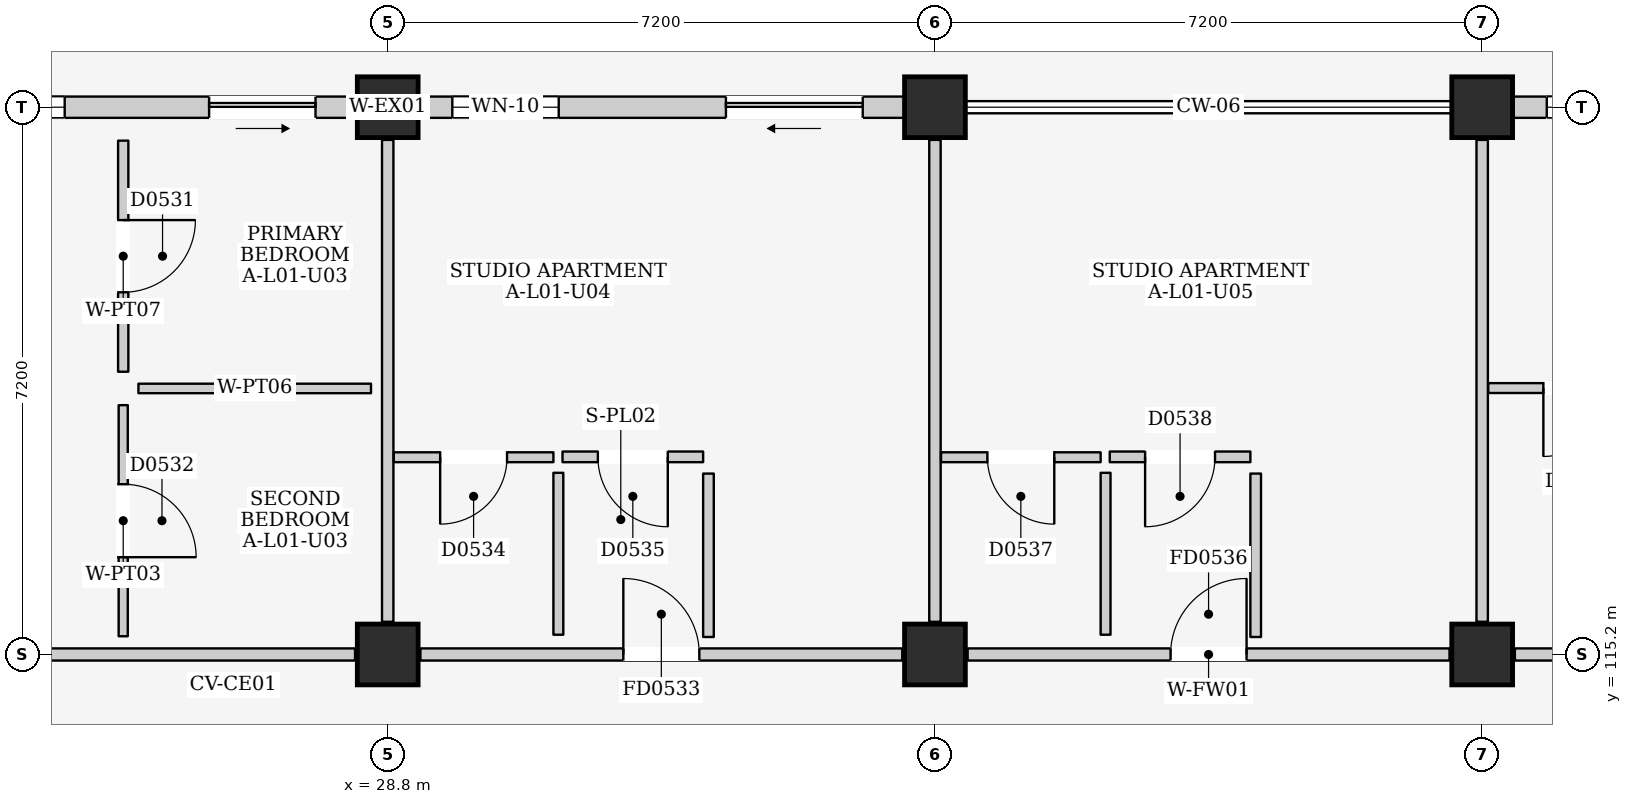
"""IFC4 building model, lengths in metres.
Left out: names, types, materials, properties, quantities, classifications, styles, units other than length and angle.
Written with IfcOpenShell. Run it as: python <this file> out.ifc"""

import sys

from ifc_helpers import new_model, si_unit, direction, frame, frame_2d, origin, origin_2d, place, context, subcontext, project, spatial, rectangle, extrude, element, fill, save


model = new_model("IFC4")
c1 = context("Model", 3, precision=1e-05, world=origin(), true_north=direction((0.0, 1.0)))
c2 = subcontext(c1, "Body", "Model", "MODEL_VIEW")
j1 = project(units=[si_unit("LENGTHUNIT", "METRE"), si_unit("PLANEANGLEUNIT", "RADIAN")], contexts=[c1])
p1 = place(None, origin())
s1 = spatial("IfcSite", under=j1, at=p1, CompositionType="ELEMENT")
p2 = place(p1, origin())
s2 = spatial("IfcBuilding", under=s1, at=p2, CompositionType="ELEMENT")
p3 = place(p2, frame((0.0, 0.0, 4.5)))
s3 = spatial("IfcBuildingStorey", under=s2, at=p3, CompositionType="ELEMENT", Elevation=4.5)
for number, where, z_axis, x_axis in (
    (1, (28.8, 115.2, 0.0), (0.0, 0.0, 1.0), (1.0, 0.0, 0.0)),
    (2, (28.8, 122.4, 0.0), (0.0, 0.0, 1.0), (1.0, 0.0, 0.0)),
    (3, (36.0, 115.2, 0.0), (0.0, 0.0, 1.0), (1.0, 0.0, 0.0)),
    (4, (36.0, 122.4, 0.0), (0.0, 0.0, 1.0), (1.0, 0.0, 0.0)),
    (5, (43.2, 115.2, 0.0), (0.0, 0.0, 1.0), (1.0, 0.0, 0.0)),
    (6, (43.2, 122.4, 0.0), (0.0, 0.0, 1.0), (1.0, 0.0, 0.0)),
):
    element("IfcColumn", number, at=place(p3, frame(where, z_axis=z_axis, x_axis=x_axis)), inside=s3, PredefinedType="COLUMN", context=c2, shape_type="SweptSolid", body=[
        extrude(rectangle(XDim=0.8, YDim=0.8, at=origin_2d()), origin(), (0.0, 0.0, 1.0), 4.5),
    ])
p4 = place(p3, frame((22.0, 122.4, 0.0), z_axis=(0.0, 0.0, 1.0), x_axis=(1.0, 0.0, 0.0)))
e7 = element("IfcWall", 7, at=p4, inside=s3, PredefinedType="ELEMENTEDWALL", context=c2, shape_type="SweptSolid", body=[
    extrude(rectangle(XDim=6.4, YDim=0.28, at=frame_2d((3.2, 0.0))), origin(), (0.0, 0.0, 1.0), 3.715),
])
p5 = place(p4, frame((4.45, 0.0, 0.0)))
e8 = element("IfcOpeningElement", 8, at=p5, cuts=e7, PredefinedType="OPENING", context=c2, shape_type="SweptSolid", body=[
    extrude(rectangle(XDim=1.4, YDim=2.1, at=frame_2d((0.7, 1.05))), frame((0.0, 0.155, 0.0), z_axis=(0.0, -1.0, 0.0), x_axis=(1.0, 0.0, 0.0)), (0.0, 0.0, 1.0), 0.31),
])
p6 = place(p4, frame((0.45, 0.0, 0.9)))
e9 = element("IfcOpeningElement", 9, at=p6, cuts=e7, PredefinedType="OPENING", context=c2, shape_type="SweptSolid", body=[
    extrude(rectangle(XDim=2.1, YDim=1.65, at=frame_2d((1.05, 0.825))), frame((0.0, 0.155, 0.0), z_axis=(0.0, -1.0, 0.0), x_axis=(1.0, 0.0, 0.0)), (0.0, 0.0, 1.0), 0.31),
])
p7 = place(p3, frame((29.2, 122.4, 0.0), z_axis=(0.0, 0.0, 1.0), x_axis=(1.0, 0.0, 0.0)))
e10 = element("IfcWall", 10, at=p7, inside=s3, PredefinedType="ELEMENTEDWALL", context=c2, shape_type="SweptSolid", body=[
    extrude(rectangle(XDim=6.4, YDim=0.28, at=frame_2d((3.2, 0.0))), origin(), (0.0, 0.0, 1.0), 3.715),
])
p8 = place(p7, frame((4.05, 0.0, 0.0)))
e11 = element("IfcOpeningElement", 11, at=p8, cuts=e10, PredefinedType="OPENING", context=c2, shape_type="SweptSolid", body=[
    extrude(rectangle(XDim=1.8, YDim=2.12, at=frame_2d((0.9, 1.06))), frame((0.0, 0.155, 0.0), z_axis=(0.0, -1.0, 0.0), x_axis=(1.0, 0.0, 0.0)), (0.0, 0.0, 1.0), 0.31),
])
p9 = place(p7, frame((0.45, 0.0, 0.9)))
e12 = element("IfcOpeningElement", 12, at=p9, cuts=e10, PredefinedType="OPENING", context=c2, shape_type="SweptSolid", body=[
    extrude(rectangle(XDim=1.4, YDim=1.2, at=frame_2d((0.7, 0.6))), frame((0.0, 0.155, 0.0), z_axis=(0.0, -1.0, 0.0), x_axis=(1.0, 0.0, 0.0)), (0.0, 0.0, 1.0), 0.31),
])
p10 = place(p3, frame((43.6, 122.4, 0.0), z_axis=(0.0, 0.0, 1.0), x_axis=(1.0, 0.0, 0.0)))
e13 = element("IfcWall", 13, at=p10, inside=s3, PredefinedType="ELEMENTEDWALL", context=c2, shape_type="SweptSolid", body=[
    extrude(rectangle(XDim=6.4, YDim=0.28, at=frame_2d((3.2, 0.0))), origin(), (0.0, 0.0, 1.0), 3.715),
])
p11 = place(p10, frame((4.35, 0.0, 0.0)))
e14 = element("IfcOpeningElement", 14, at=p11, cuts=e13, PredefinedType="OPENING", context=c2, shape_type="SweptSolid", body=[
    extrude(rectangle(XDim=1.5, YDim=2.12, at=frame_2d((0.75, 1.06))), frame((0.0, 0.155, 0.0), z_axis=(0.0, -1.0, 0.0), x_axis=(1.0, 0.0, 0.0)), (0.0, 0.0, 1.0), 0.31),
])
p12 = place(p10, frame((0.45, 0.0, 0.9)))
e15 = element("IfcOpeningElement", 15, at=p12, cuts=e13, PredefinedType="OPENING", context=c2, shape_type="SweptSolid", body=[
    extrude(rectangle(XDim=1.7, YDim=1.45, at=frame_2d((0.85, 0.725))), frame((0.0, 0.155, 0.0), z_axis=(0.0, -1.0, 0.0), x_axis=(1.0, 0.0, 0.0)), (0.0, 0.0, 1.0), 0.31),
])
p13 = place(p3, frame((22.03, 115.2, 0.0), z_axis=(0.0, 0.0, 1.0), x_axis=(1.0, 0.0, 0.0)))
e16 = element("IfcWall", 16, at=p13, inside=s3, PredefinedType="PARTITIONING", context=c2, shape_type="SweptSolid", body=[
    extrude(rectangle(XDim=6.34, YDim=0.16, at=frame_2d((3.17, 0.0))), origin(), (0.0, 0.0, 1.0), 3.585),
])
p14 = place(p3, frame((28.8, 115.63, 0.0), z_axis=(0.0, 0.0, 1.0), x_axis=(0.0, 1.0, 0.0)))
e17 = element("IfcWall", 17, at=p14, inside=s3, PredefinedType="PARTITIONING", context=c2, shape_type="SweptSolid", body=[
    extrude(rectangle(XDim=6.34, YDim=0.15, at=frame_2d((3.17, 0.0))), origin(), (0.0, 0.0, 1.0), 3.685),
])
p15 = place(p3, frame((25.32, 118.92, 0.0), z_axis=(0.0, 0.0, 1.0), x_axis=(0.0, 1.0, 0.0)))
e18 = element("IfcWall", 18, at=p15, inside=s3, PredefinedType="PARTITIONING", context=c2, shape_type="SweptSolid", body=[
    extrude(rectangle(XDim=3.04, YDim=0.135, at=frame_2d((1.52, 0.0))), origin(), (0.0, 0.0, 1.0), 4.25),
])
p16 = place(p15, frame((1.045, 0.0, 0.0)))
e19 = element("IfcOpeningElement", 19, at=p16, cuts=e18, PredefinedType="OPENING", context=c2, shape_type="SweptSolid", body=[
    extrude(rectangle(XDim=0.95, YDim=2.15, at=frame_2d((0.475, 1.075))), frame((0.0, 0.083, 0.0), z_axis=(0.0, -1.0, 0.0), x_axis=(1.0, 0.0, 0.0)), (0.0, 0.0, 1.0), 0.165),
])
p17 = place(p3, frame((25.52, 118.7, 0.0), z_axis=(0.0, 0.0, 1.0), x_axis=(1.0, 0.0, 0.0)))
e20 = element("IfcWall", 20, at=p17, inside=s3, PredefinedType="PARTITIONING", context=c2, shape_type="SweptSolid", body=[
    extrude(rectangle(XDim=3.06, YDim=0.125, at=frame_2d((1.53, 0.0))), origin(), (0.0, 0.0, 1.0), 4.25),
])
p18 = place(p3, frame((25.32, 115.44, 0.0), z_axis=(0.0, 0.0, 1.0), x_axis=(0.0, 1.0, 0.0)))
e21 = element("IfcWall", 21, at=p18, inside=s3, PredefinedType="PARTITIONING", context=c2, shape_type="SweptSolid", body=[
    extrude(rectangle(XDim=3.04, YDim=0.12, at=frame_2d((1.52, 0.0))), origin(), (0.0, 0.0, 1.0), 4.25),
])
p19 = place(p18, frame((1.04, 0.0, 0.0)))
e22 = element("IfcOpeningElement", 22, at=p19, cuts=e21, PredefinedType="OPENING", context=c2, shape_type="SweptSolid", body=[
    extrude(rectangle(XDim=0.96, YDim=2.15, at=frame_2d((0.48, 1.075))), frame((0.0, 0.075, 0.0), z_axis=(0.0, -1.0, 0.0), x_axis=(1.0, 0.0, 0.0)), (0.0, 0.0, 1.0), 0.15),
])
p20 = place(p3, frame((29.23, 115.2, 0.0), z_axis=(0.0, 0.0, 1.0), x_axis=(1.0, 0.0, 0.0)))
e23 = element("IfcWall", 23, at=p20, inside=s3, PredefinedType="PARTITIONING", context=c2, shape_type="SweptSolid", body=[
    extrude(rectangle(XDim=6.34, YDim=0.16, at=frame_2d((3.17, 0.0))), origin(), (0.0, 0.0, 1.0), 3.585),
])
p21 = place(p20, frame((2.67, 0.0, 0.0)))
e24 = element("IfcOpeningElement", 24, at=p21, cuts=e23, PredefinedType="OPENING", context=c2, shape_type="SweptSolid", body=[
    extrude(rectangle(XDim=1.0, YDim=2.15, at=frame_2d((0.5, 1.075))), frame((0.0, 0.095, 0.0), z_axis=(0.0, -1.0, 0.0), x_axis=(1.0, 0.0, 0.0)), (0.0, 0.0, 1.0), 0.19),
])
p22 = place(p3, frame((36.0, 115.63, 0.0), z_axis=(0.0, 0.0, 1.0), x_axis=(0.0, 1.0, 0.0)))
e25 = element("IfcWall", 25, at=p22, inside=s3, PredefinedType="PARTITIONING", context=c2, shape_type="SweptSolid", body=[
    extrude(rectangle(XDim=6.34, YDim=0.15, at=frame_2d((3.17, 0.0))), origin(), (0.0, 0.0, 1.0), 3.685),
])
p23 = place(p3, frame((28.88, 117.795, 0.0), z_axis=(0.0, 0.0, 1.0), x_axis=(1.0, 0.0, 0.0)))
e26 = element("IfcWall", 26, at=p23, inside=s3, PredefinedType="PARTITIONING", context=c2, shape_type="SweptSolid", body=[
    extrude(rectangle(XDim=2.1, YDim=0.13, at=frame_2d((1.05, 0.0))), origin(), (0.0, 0.0, 1.0), 4.25),
])
p24 = place(p23, frame((0.61, 0.0, 0.0)))
e27 = element("IfcOpeningElement", 27, at=p24, cuts=e26, PredefinedType="OPENING", context=c2, shape_type="SweptSolid", body=[
    extrude(rectangle(XDim=0.88, YDim=2.1, at=frame_2d((0.44, 1.05))), frame((0.0, 0.08, 0.0), z_axis=(0.0, -1.0, 0.0), x_axis=(1.0, 0.0, 0.0)), (0.0, 0.0, 1.0), 0.16),
])
p25 = place(p3, frame((31.045, 115.46, 0.0), z_axis=(0.0, 0.0, 1.0), x_axis=(0.0, 1.0, 0.0)))
e28 = element("IfcWall", 28, at=p25, inside=s3, PredefinedType="PARTITIONING", context=c2, shape_type="SweptSolid", body=[
    extrude(rectangle(XDim=2.13, YDim=0.13, at=frame_2d((1.065, 0.0))), origin(), (0.0, 0.0, 1.0), 4.25),
])
p26 = place(p3, frame((31.1, 117.8, 0.0), z_axis=(0.0, 0.0, 1.0), x_axis=(1.0, 0.0, 0.0)))
e29 = element("IfcWall", 29, at=p26, inside=s3, PredefinedType="PARTITIONING", context=c2, shape_type="SweptSolid", body=[
    extrude(rectangle(XDim=1.85, YDim=0.14, at=frame_2d((0.925, 0.0))), origin(), (0.0, 0.0, 1.0), 4.25),
])
p27 = place(p26, frame((0.465, 0.0, 0.0)))
e30 = element("IfcOpeningElement", 30, at=p27, cuts=e29, PredefinedType="OPENING", context=c2, shape_type="SweptSolid", body=[
    extrude(rectangle(XDim=0.92, YDim=2.1, at=frame_2d((0.46, 1.05))), frame((0.0, 0.085, 0.0), z_axis=(0.0, -1.0, 0.0), x_axis=(1.0, 0.0, 0.0)), (0.0, 0.0, 1.0), 0.17),
])
p28 = place(p3, frame((33.02, 115.43, 0.0), z_axis=(0.0, 0.0, 1.0), x_axis=(0.0, 1.0, 0.0)))
e31 = element("IfcWall", 31, at=p28, inside=s3, PredefinedType="PARTITIONING", context=c2, shape_type="SweptSolid", body=[
    extrude(rectangle(XDim=2.15, YDim=0.14, at=frame_2d((1.075, 0.0))), origin(), (0.0, 0.0, 1.0), 4.25),
])
p29 = place(p3, frame((36.43, 115.2, 0.0), z_axis=(0.0, 0.0, 1.0), x_axis=(1.0, 0.0, 0.0)))
e32 = element("IfcWall", 32, at=p29, inside=s3, PredefinedType="PARTITIONING", context=c2, shape_type="SweptSolid", body=[
    extrude(rectangle(XDim=6.34, YDim=0.16, at=frame_2d((3.17, 0.0))), origin(), (0.0, 0.0, 1.0), 3.585),
])
p30 = place(p29, frame((2.67, 0.0, 0.0)))
e33 = element("IfcOpeningElement", 33, at=p30, cuts=e32, PredefinedType="OPENING", context=c2, shape_type="SweptSolid", body=[
    extrude(rectangle(XDim=1.0, YDim=2.15, at=frame_2d((0.5, 1.075))), frame((0.0, 0.095, 0.0), z_axis=(0.0, -1.0, 0.0), x_axis=(1.0, 0.0, 0.0)), (0.0, 0.0, 1.0), 0.19),
])
p31 = place(p3, frame((43.2, 115.63, 0.0), z_axis=(0.0, 0.0, 1.0), x_axis=(0.0, 1.0, 0.0)))
e34 = element("IfcWall", 34, at=p31, inside=s3, PredefinedType="PARTITIONING", context=c2, shape_type="SweptSolid", body=[
    extrude(rectangle(XDim=6.34, YDim=0.15, at=frame_2d((3.17, 0.0))), origin(), (0.0, 0.0, 1.0), 3.685),
])
p32 = place(p3, frame((36.08, 117.795, 0.0), z_axis=(0.0, 0.0, 1.0), x_axis=(1.0, 0.0, 0.0)))
e35 = element("IfcWall", 35, at=p32, inside=s3, PredefinedType="PARTITIONING", context=c2, shape_type="SweptSolid", body=[
    extrude(rectangle(XDim=2.1, YDim=0.13, at=frame_2d((1.05, 0.0))), origin(), (0.0, 0.0, 1.0), 4.25),
])
p33 = place(p32, frame((0.61, 0.0, 0.0)))
e36 = element("IfcOpeningElement", 36, at=p33, cuts=e35, PredefinedType="OPENING", context=c2, shape_type="SweptSolid", body=[
    extrude(rectangle(XDim=0.88, YDim=2.1, at=frame_2d((0.44, 1.05))), frame((0.0, 0.08, 0.0), z_axis=(0.0, -1.0, 0.0), x_axis=(1.0, 0.0, 0.0)), (0.0, 0.0, 1.0), 0.16),
])
p34 = place(p3, frame((38.245, 115.46, 0.0), z_axis=(0.0, 0.0, 1.0), x_axis=(0.0, 1.0, 0.0)))
e37 = element("IfcWall", 37, at=p34, inside=s3, PredefinedType="PARTITIONING", context=c2, shape_type="SweptSolid", body=[
    extrude(rectangle(XDim=2.13, YDim=0.13, at=frame_2d((1.065, 0.0))), origin(), (0.0, 0.0, 1.0), 4.25),
])
p35 = place(p3, frame((38.3, 117.8, 0.0), z_axis=(0.0, 0.0, 1.0), x_axis=(1.0, 0.0, 0.0)))
e38 = element("IfcWall", 38, at=p35, inside=s3, PredefinedType="PARTITIONING", context=c2, shape_type="SweptSolid", body=[
    extrude(rectangle(XDim=1.85, YDim=0.14, at=frame_2d((0.925, 0.0))), origin(), (0.0, 0.0, 1.0), 4.25),
])
p36 = place(p35, frame((0.465, 0.0, 0.0)))
e39 = element("IfcOpeningElement", 39, at=p36, cuts=e38, PredefinedType="OPENING", context=c2, shape_type="SweptSolid", body=[
    extrude(rectangle(XDim=0.92, YDim=2.1, at=frame_2d((0.46, 1.05))), frame((0.0, 0.085, 0.0), z_axis=(0.0, -1.0, 0.0), x_axis=(1.0, 0.0, 0.0)), (0.0, 0.0, 1.0), 0.17),
])
p37 = place(p3, frame((40.22, 115.43, 0.0), z_axis=(0.0, 0.0, 1.0), x_axis=(0.0, 1.0, 0.0)))
e40 = element("IfcWall", 40, at=p37, inside=s3, PredefinedType="PARTITIONING", context=c2, shape_type="SweptSolid", body=[
    extrude(rectangle(XDim=2.15, YDim=0.14, at=frame_2d((1.075, 0.0))), origin(), (0.0, 0.0, 1.0), 4.25),
])
p38 = place(p3, frame((43.63, 115.2, 0.0), z_axis=(0.0, 0.0, 1.0), x_axis=(1.0, 0.0, 0.0)))
e41 = element("IfcWall", 41, at=p38, inside=s3, PredefinedType="PARTITIONING", context=c2, shape_type="SweptSolid", body=[
    extrude(rectangle(XDim=6.34, YDim=0.16, at=frame_2d((3.17, 0.0))), origin(), (0.0, 0.0, 1.0), 3.585),
])
p39 = place(p38, frame((5.16, 0.0, 0.0)))
e42 = element("IfcOpeningElement", 42, at=p39, cuts=e41, PredefinedType="OPENING", context=c2, shape_type="SweptSolid", body=[
    extrude(rectangle(XDim=1.0, YDim=2.15, at=frame_2d((0.5, 1.075))), frame((0.0, 0.095, 0.0), z_axis=(0.0, -1.0, 0.0), x_axis=(1.0, 0.0, 0.0)), (0.0, 0.0, 1.0), 0.19),
])
p40 = place(p3, frame((43.28, 118.705, 0.0), z_axis=(0.0, 0.0, 1.0), x_axis=(1.0, 0.0, 0.0)))
e43 = element("IfcWall", 43, at=p40, inside=s3, PredefinedType="PARTITIONING", context=c2, shape_type="SweptSolid", body=[
    extrude(rectangle(XDim=2.35, YDim=0.13, at=frame_2d((1.175, 0.0))), origin(), (0.0, 0.0, 1.0), 4.25),
])
p41 = place(p40, frame((0.725, 0.0, 0.0)))
e44 = element("IfcOpeningElement", 44, at=p41, cuts=e43, PredefinedType="OPENING", context=c2, shape_type="SweptSolid", body=[
    extrude(rectangle(XDim=0.9, YDim=2.1, at=frame_2d((0.45, 1.05))), frame((0.0, 0.08, 0.0), z_axis=(0.0, -1.0, 0.0), x_axis=(1.0, 0.0, 0.0)), (0.0, 0.0, 1.0), 0.16),
])
p42 = place(p5, frame((1.4, 0.0, 0.0), z_axis=(0.0, 0.0, 1.0), x_axis=(-1.0, 0.0, 0.0)))
e45 = element("IfcDoor", 45, at=p42, inside=s3, OperationType="SLIDING_TO_RIGHT", PredefinedType="DOOR", context=c2, shape_type="SweptSolid", body=[
    extrude(rectangle(XDim=1.4, YDim=2.1, at=frame_2d((0.7, 1.05))), frame((0.0, 0.025, 0.0), z_axis=(0.0, -1.0, 0.0), x_axis=(1.0, 0.0, 0.0)), (0.0, 0.0, 1.0), 0.05),
])
fill(e8, e45)
p43 = place(p6, origin())
e46 = element("IfcWindow", 46, at=p43, inside=s3, PartitioningType="DOUBLE_PANEL_VERTICAL", PredefinedType="WINDOW", context=c2, shape_type="SweptSolid", body=[
    extrude(rectangle(XDim=2.1, YDim=1.65, at=frame_2d((1.05, 0.825))), frame((0.0, 0.03, 0.0), z_axis=(0.0, -1.0, 0.0), x_axis=(1.0, 0.0, 0.0)), (0.0, 0.0, 1.0), 0.06),
])
fill(e9, e46)
p44 = place(p8, frame((1.8, 0.0, 0.0), z_axis=(0.0, 0.0, 1.0), x_axis=(-1.0, 0.0, 0.0)))
e47 = element("IfcDoor", 47, at=p44, inside=s3, OperationType="SLIDING_TO_LEFT", PredefinedType="DOOR", context=c2, shape_type="SweptSolid", body=[
    extrude(rectangle(XDim=1.8, YDim=2.12, at=frame_2d((0.9, 1.06))), frame((0.0, 0.025, 0.0), z_axis=(0.0, -1.0, 0.0), x_axis=(1.0, 0.0, 0.0)), (0.0, 0.0, 1.0), 0.05),
])
fill(e11, e47)
p45 = place(p9, origin())
e48 = element("IfcWindow", 48, at=p45, inside=s3, PartitioningType="DOUBLE_PANEL_HORIZONTAL", PredefinedType="WINDOW", context=c2, shape_type="SweptSolid", body=[
    extrude(rectangle(XDim=1.4, YDim=1.2, at=frame_2d((0.7, 0.6))), frame((0.0, 0.03, 0.0), z_axis=(0.0, -1.0, 0.0), x_axis=(1.0, 0.0, 0.0)), (0.0, 0.0, 1.0), 0.06),
])
fill(e12, e48)
p46 = place(p12, origin())
e49 = element("IfcWindow", 49, at=p46, inside=s3, PartitioningType="DOUBLE_PANEL_VERTICAL", PredefinedType="WINDOW", context=c2, shape_type="SweptSolid", body=[
    extrude(rectangle(XDim=1.7, YDim=1.45, at=frame_2d((0.85, 0.725))), frame((0.0, 0.03, 0.0), z_axis=(0.0, -1.0, 0.0), x_axis=(1.0, 0.0, 0.0)), (0.0, 0.0, 1.0), 0.06),
])
fill(e15, e49)
p47 = place(p16, frame((0.95, 0.0, 0.0), z_axis=(0.0, 0.0, 1.0), x_axis=(-1.0, 0.0, 0.0)))
e50 = element("IfcDoor", 50, at=p47, inside=s3, OperationType="SINGLE_SWING_LEFT", PredefinedType="DOOR", context=c2, shape_type="SweptSolid", body=[
    extrude(rectangle(XDim=0.95, YDim=2.15, at=frame_2d((0.475, 1.075))), frame((0.0, 0.025, 0.0), z_axis=(0.0, -1.0, 0.0), x_axis=(1.0, 0.0, 0.0)), (0.0, 0.0, 1.0), 0.05),
])
fill(e19, e50)
p48 = place(p19, frame((0.96, 0.0, 0.0), z_axis=(0.0, 0.0, 1.0), x_axis=(-1.0, 0.0, 0.0)))
e51 = element("IfcDoor", 51, at=p48, inside=s3, OperationType="SINGLE_SWING_RIGHT", PredefinedType="DOOR", context=c2, shape_type="SweptSolid", body=[
    extrude(rectangle(XDim=0.96, YDim=2.15, at=frame_2d((0.48, 1.075))), frame((0.0, 0.025, 0.0), z_axis=(0.0, -1.0, 0.0), x_axis=(1.0, 0.0, 0.0)), (0.0, 0.0, 1.0), 0.05),
])
fill(e22, e51)
p49 = place(p21, origin())
e52 = element("IfcDoor", 52, at=p49, inside=s3, OperationType="SINGLE_SWING_LEFT", PredefinedType="DOOR", context=c2, shape_type="SweptSolid", body=[
    extrude(rectangle(XDim=1.0, YDim=2.15, at=frame_2d((0.5, 1.075))), frame((0.0, 0.025, 0.0), z_axis=(0.0, -1.0, 0.0), x_axis=(1.0, 0.0, 0.0)), (0.0, 0.0, 1.0), 0.05),
])
fill(e24, e52)
p50 = place(p24, frame((0.88, 0.0, 0.0), z_axis=(0.0, 0.0, 1.0), x_axis=(-1.0, 0.0, 0.0)))
e53 = element("IfcDoor", 53, at=p50, inside=s3, OperationType="SINGLE_SWING_RIGHT", PredefinedType="DOOR", context=c2, shape_type="SweptSolid", body=[
    extrude(rectangle(XDim=0.88, YDim=2.1, at=frame_2d((0.44, 1.05))), frame((0.0, 0.025, 0.0), z_axis=(0.0, -1.0, 0.0), x_axis=(1.0, 0.0, 0.0)), (0.0, 0.0, 1.0), 0.05),
])
fill(e27, e53)
p51 = place(p27, frame((0.92, 0.0, 0.0), z_axis=(0.0, 0.0, 1.0), x_axis=(-1.0, 0.0, 0.0)))
e54 = element("IfcDoor", 54, at=p51, inside=s3, OperationType="SINGLE_SWING_LEFT", PredefinedType="DOOR", context=c2, shape_type="SweptSolid", body=[
    extrude(rectangle(XDim=0.92, YDim=2.1, at=frame_2d((0.46, 1.05))), frame((0.0, 0.025, 0.0), z_axis=(0.0, -1.0, 0.0), x_axis=(1.0, 0.0, 0.0)), (0.0, 0.0, 1.0), 0.05),
])
fill(e30, e54)
p52 = place(p30, origin())
e55 = element("IfcDoor", 55, at=p52, inside=s3, OperationType="SINGLE_SWING_RIGHT", PredefinedType="DOOR", context=c2, shape_type="SweptSolid", body=[
    extrude(rectangle(XDim=1.0, YDim=2.15, at=frame_2d((0.5, 1.075))), frame((0.0, 0.025, 0.0), z_axis=(0.0, -1.0, 0.0), x_axis=(1.0, 0.0, 0.0)), (0.0, 0.0, 1.0), 0.05),
])
fill(e33, e55)
p53 = place(p33, frame((0.88, 0.0, 0.0), z_axis=(0.0, 0.0, 1.0), x_axis=(-1.0, 0.0, 0.0)))
e56 = element("IfcDoor", 56, at=p53, inside=s3, OperationType="SINGLE_SWING_LEFT", PredefinedType="DOOR", context=c2, shape_type="SweptSolid", body=[
    extrude(rectangle(XDim=0.88, YDim=2.1, at=frame_2d((0.44, 1.05))), frame((0.0, 0.025, 0.0), z_axis=(0.0, -1.0, 0.0), x_axis=(1.0, 0.0, 0.0)), (0.0, 0.0, 1.0), 0.05),
])
fill(e36, e56)
p54 = place(p36, frame((0.92, 0.0, 0.0), z_axis=(0.0, 0.0, 1.0), x_axis=(-1.0, 0.0, 0.0)))
e57 = element("IfcDoor", 57, at=p54, inside=s3, OperationType="SINGLE_SWING_RIGHT", PredefinedType="DOOR", context=c2, shape_type="SweptSolid", body=[
    extrude(rectangle(XDim=0.92, YDim=2.1, at=frame_2d((0.46, 1.05))), frame((0.0, 0.025, 0.0), z_axis=(0.0, -1.0, 0.0), x_axis=(1.0, 0.0, 0.0)), (0.0, 0.0, 1.0), 0.05),
])
fill(e39, e57)
p55 = place(p41, frame((0.9, 0.0, 0.0), z_axis=(0.0, 0.0, 1.0), x_axis=(-1.0, 0.0, 0.0)))
e58 = element("IfcDoor", 58, at=p55, inside=s3, OperationType="SINGLE_SWING_RIGHT", PredefinedType="DOOR", context=c2, shape_type="SweptSolid", body=[
    extrude(rectangle(XDim=0.9, YDim=2.1, at=frame_2d((0.45, 1.05))), frame((0.0, 0.025, 0.0), z_axis=(0.0, -1.0, 0.0), x_axis=(1.0, 0.0, 0.0)), (0.0, 0.0, 1.0), 0.05),
])
fill(e44, e58)
save(model, sys.argv[1])
